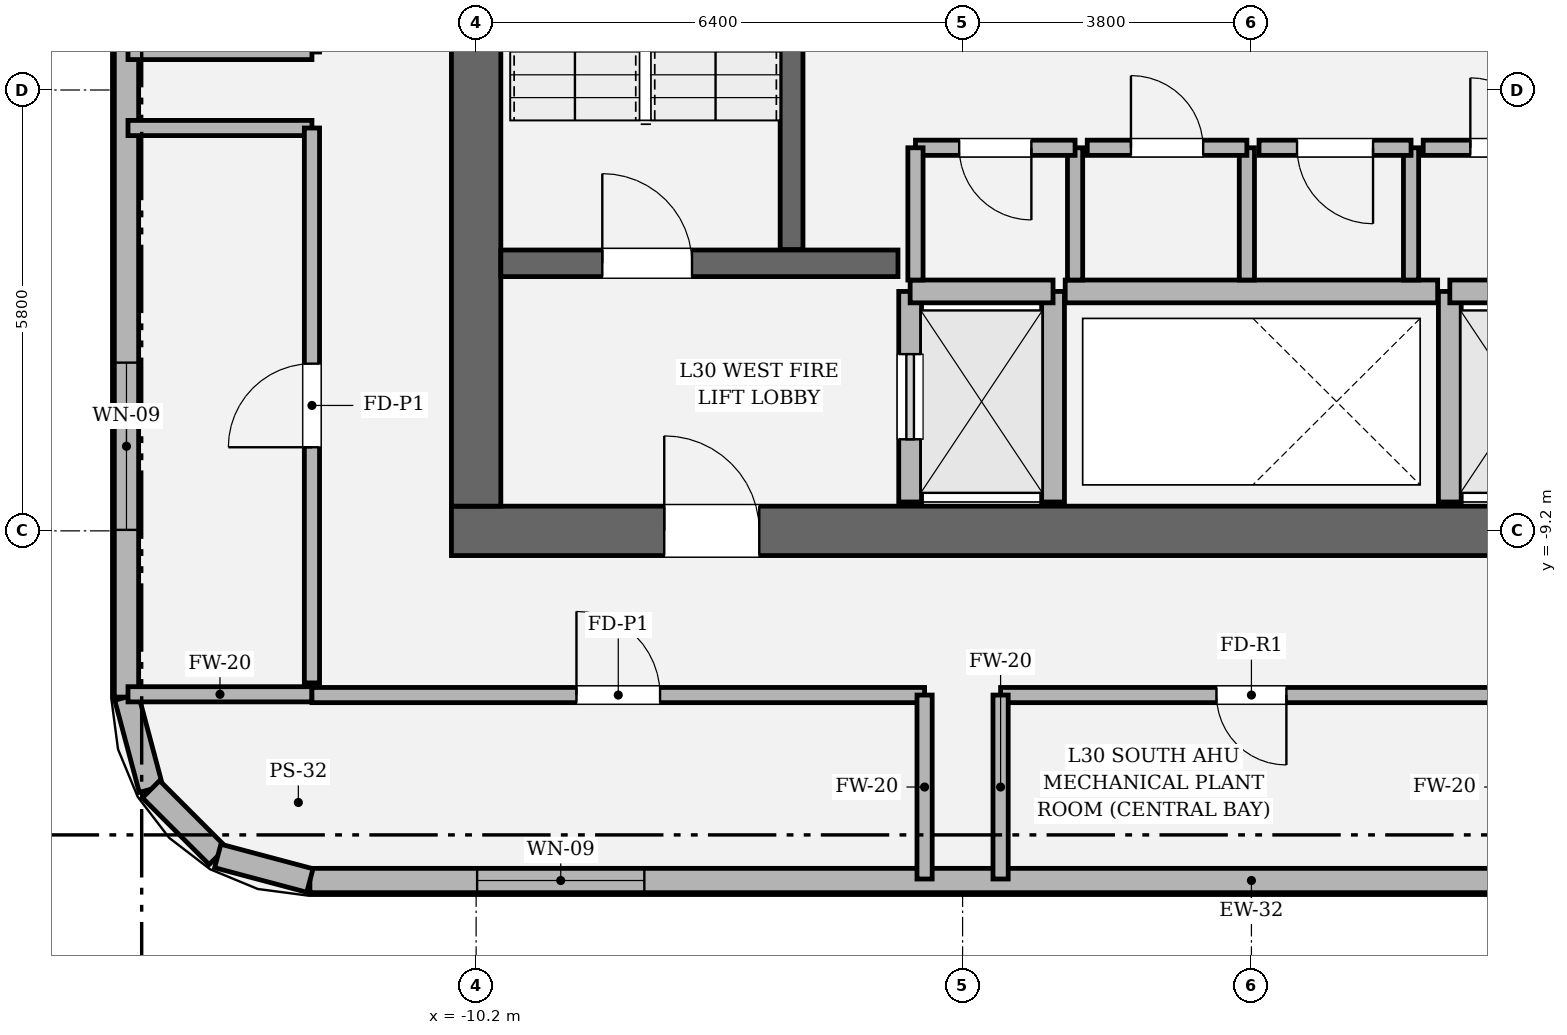
"""IFC4 building model, lengths in metres.
Left out: names, types, materials, properties, quantities, classifications, styles, units other than length and angle.
Written with IfcOpenShell. Run it as: python <this file> out.ifc"""

import sys

from ifc_helpers import new_model, si_unit, direction, frame, frame_2d, origin, place, context, subcontext, project, spatial, rectangle, extrude, element, fill, save


model = new_model("IFC4")
c1 = context("Model", 3, precision=1e-05, world=origin(), true_north=direction((0.0, 1.0)))
c2 = subcontext(c1, "Body", "Model", "MODEL_VIEW")
j1 = project(units=[si_unit("LENGTHUNIT", "METRE"), si_unit("PLANEANGLEUNIT", "RADIAN")], contexts=[c1])
p1 = place(None, origin())
s1 = spatial("IfcSite", under=j1, at=p1, CompositionType="ELEMENT")
p2 = place(p1, origin())
s2 = spatial("IfcBuilding", under=s1, at=p2, CompositionType="ELEMENT")
p3 = place(p2, frame((0.0, 0.0, 130.2)))
s3 = spatial("IfcBuildingStorey", under=s2, at=p3, CompositionType="ELEMENT", Elevation=130.2)
p4 = place(p3, frame((10.525, -9.2, 0.0), z_axis=(0.0, 0.0, 1.0), x_axis=(-1.0, 0.0, 0.0)))
e1 = element("IfcWall", 1, at=p4, inside=s3, PredefinedType="SHEAR", context=c2, shape_type="SweptSolid", body=[
    extrude(rectangle(XDim=21.05, YDim=0.65, at=frame_2d((10.525, 0.0))), origin(), (0.0, 0.0, 1.0), 4.8),
])
p5 = place(p4, frame((2.8, 0.0, 0.0)))
e2 = element("IfcOpeningElement", 2, at=p5, cuts=e1, PredefinedType="OPENING", context=c2, shape_type="SweptSolid", body=[
    extrude(rectangle(XDim=1.25, YDim=2.25, at=frame_2d((0.625, 1.125))), frame((0.0, 0.335, 0.0), z_axis=(0.0, -1.0, 0.0), x_axis=(1.0, 0.0, 0.0)), (0.0, 0.0, 1.0), 0.67),
])
p6 = place(p4, frame((17.0, 0.0, 0.0)))
e3 = element("IfcOpeningElement", 3, at=p6, cuts=e1, PredefinedType="OPENING", context=c2, shape_type="SweptSolid", body=[
    extrude(rectangle(XDim=1.25, YDim=2.25, at=frame_2d((0.625, 1.125))), frame((0.0, 0.335, 0.0), z_axis=(0.0, -1.0, 0.0), x_axis=(1.0, 0.0, 0.0)), (0.0, 0.0, 1.0), 0.67),
])
p7 = place(p3, frame((-10.2, -8.875, 0.0), z_axis=(0.0, 0.0, 1.0), x_axis=(0.0, 1.0, 0.0)))
e4 = element("IfcWall", 4, at=p7, inside=s3, PredefinedType="SHEAR", context=c2, shape_type="SweptSolid", body=[
    extrude(rectangle(XDim=17.75, YDim=0.65, at=frame_2d((8.875, 0.0))), origin(), (0.0, 0.0, 1.0), 4.8),
])
p8 = place(p7, frame((12.665, 0.0, 0.0)))
e5 = element("IfcOpeningElement", 5, at=p8, cuts=e4, PredefinedType="OPENING", context=c2, shape_type="SweptSolid", body=[
    extrude(rectangle(XDim=1.18, YDim=2.2, at=frame_2d((0.59, 1.1))), frame((0.0, 0.335, 0.0), z_axis=(0.0, -1.0, 0.0), x_axis=(1.0, 0.0, 0.0)), (0.0, 0.0, 1.0), 0.67),
])
p9 = place(p3, frame((-6.05, -5.5, 0.0), z_axis=(0.0, 0.0, 1.0), x_axis=(0.0, 1.0, 0.0)))
e6 = element("IfcWall", 6, at=p9, inside=s3, PredefinedType="SOLIDWALL", context=c2, shape_type="SweptSolid", body=[
    extrude(rectangle(XDim=8.95, YDim=0.3, at=frame_2d((4.475, 0.0))), origin(), (0.0, 0.0, 1.0), 4.8),
])
p10 = place(p3, frame((-9.875, -5.68, 0.0), z_axis=(0.0, 0.0, 1.0), x_axis=(1.0, 0.0, 0.0)))
e7 = element("IfcWall", 7, at=p10, inside=s3, PredefinedType="SOLIDWALL", context=c2, shape_type="SweptSolid", body=[
    extrude(rectangle(XDim=5.225, YDim=0.35, at=frame_2d((2.613, 0.0))), origin(), (0.0, 0.0, 1.0), 4.8),
])
p11 = place(p10, frame((1.335, 0.0, 0.0)))
e8 = element("IfcOpeningElement", 8, at=p11, cuts=e7, PredefinedType="OPENING", context=c2, shape_type="SweptSolid", body=[
    extrude(rectangle(XDim=1.18, YDim=2.2, at=frame_2d((0.59, 1.1))), frame((0.0, 0.185, 0.0), z_axis=(0.0, -1.0, 0.0), x_axis=(1.0, 0.0, 0.0)), (0.0, 0.0, 1.0), 0.37),
])
p12 = place(p3, frame((-12.387, -13.8, 0.0), z_axis=(0.0, 0.0, 1.0), x_axis=(1.0, 0.0, 0.0)))
e9 = element("IfcWall", 9, at=p12, inside=s3, PredefinedType="SOLIDWALL", context=c2, shape_type="SweptSolid", body=[
    extrude(rectangle(XDim=24.774, YDim=0.32, at=frame_2d((12.387, 0.0))), origin(), (0.0, 0.0, 1.0), 3.834),
])
p13 = place(p12, frame((2.2, 0.0, 0.9)))
e10 = element("IfcOpeningElement", 10, at=p13, cuts=e9, PredefinedType="OPENING", context=c2, shape_type="SweptSolid", body=[
    extrude(rectangle(XDim=2.2, YDim=1.2, at=frame_2d((1.1, 0.6))), frame((0.0, 0.17, 0.0), z_axis=(0.0, -1.0, 0.0), x_axis=(1.0, 0.0, 0.0)), (0.0, 0.0, 1.0), 0.34),
])
p14 = place(p12, frame((20.374, 0.0, 0.9)))
e11 = element("IfcOpeningElement", 11, at=p14, cuts=e9, PredefinedType="OPENING", context=c2, shape_type="SweptSolid", body=[
    extrude(rectangle(XDim=2.2, YDim=1.2, at=frame_2d((1.1, 0.6))), frame((0.0, 0.17, 0.0), z_axis=(0.0, -1.0, 0.0), x_axis=(1.0, 0.0, 0.0)), (0.0, 0.0, 1.0), 0.34),
])
p15 = place(p3, frame((-14.8, 11.387, 0.0), z_axis=(0.0, 0.0, 1.0), x_axis=(0.0, -1.0, 0.0)))
e12 = element("IfcWall", 12, at=p15, inside=s3, PredefinedType="SOLIDWALL", context=c2, shape_type="SweptSolid", body=[
    extrude(rectangle(XDim=22.774, YDim=0.32, at=frame_2d((11.387, 0.0))), origin(), (0.0, 0.0, 1.0), 3.834),
])
p16 = place(p15, frame((2.2, 0.0, 0.9)))
e13 = element("IfcOpeningElement", 13, at=p16, cuts=e12, PredefinedType="OPENING", context=c2, shape_type="SweptSolid", body=[
    extrude(rectangle(XDim=2.2, YDim=1.2, at=frame_2d((1.1, 0.6))), frame((0.0, 0.17, 0.0), z_axis=(0.0, -1.0, 0.0), x_axis=(1.0, 0.0, 0.0)), (0.0, 0.0, 1.0), 0.34),
])
p17 = place(p15, frame((18.374, 0.0, 0.9)))
e14 = element("IfcOpeningElement", 14, at=p17, cuts=e12, PredefinedType="OPENING", context=c2, shape_type="SweptSolid", body=[
    extrude(rectangle(XDim=2.2, YDim=1.2, at=frame_2d((1.1, 0.6))), frame((0.0, 0.17, 0.0), z_axis=(0.0, -1.0, 0.0), x_axis=(1.0, 0.0, 0.0)), (0.0, 0.0, 1.0), 0.34),
])
p18 = place(p3, frame((-14.8, -11.387, 0.0), z_axis=(0.0, 0.0, 1.0), x_axis=(0.25748094776, -0.966283375382, 0.0)))
e15 = element("IfcWall", 15, at=p18, inside=s3, PredefinedType="SOLIDWALL", context=c2, shape_type="SweptSolid", body=[
    extrude(rectangle(XDim=1.254, YDim=0.32, at=frame_2d((0.627, 0.0))), origin(), (0.0, 0.0, 1.0), 3.984),
])
p19 = place(p3, frame((-14.477, -12.599, 0.0), z_axis=(0.0, 0.0, 1.0), x_axis=(0.707106781187, -0.707106781187, 0.0)))
e16 = element("IfcWall", 16, at=p19, inside=s3, PredefinedType="SOLIDWALL", context=c2, shape_type="SweptSolid", body=[
    extrude(rectangle(XDim=1.242, YDim=0.32, at=frame_2d((0.621, 0.0))), origin(), (0.0, 0.0, 1.0), 3.984),
])
p20 = place(p3, frame((-13.599, -13.477, 0.0), z_axis=(0.0, 0.0, 1.0), x_axis=(0.966283375382, -0.25748094776, 0.0)))
e17 = element("IfcWall", 17, at=p20, inside=s3, PredefinedType="SOLIDWALL", context=c2, shape_type="SweptSolid", body=[
    extrude(rectangle(XDim=1.254, YDim=0.32, at=frame_2d((0.627, 0.0))), origin(), (0.0, 0.0, 1.0), 3.984),
])
p21 = place(p3, frame((-4.49, -8.82, 0.0), z_axis=(0.0, 0.0, 1.0), x_axis=(0.0, 1.0, 0.0)))
e18 = element("IfcWall", 18, at=p21, inside=s3, PredefinedType="SOLIDWALL", context=c2, shape_type="SweptSolid", body=[
    extrude(rectangle(XDim=2.77, YDim=0.3, at=frame_2d((1.385, 0.0))), origin(), (0.0, 0.0, 1.0), 4.54),
])
p22 = place(p21, frame((0.825, 0.0, 0.0)))
e19 = element("IfcOpeningElement", 19, at=p22, cuts=e18, PredefinedType="OPENING", context=c2, shape_type="SweptSolid", body=[
    extrude(rectangle(XDim=1.12, YDim=2.25, at=frame_2d((0.56, 1.125))), frame((0.0, 0.16, 0.0), z_axis=(0.0, -1.0, 0.0), x_axis=(1.0, 0.0, 0.0)), (0.0, 0.0, 1.0), 0.32),
])
p23 = place(p3, frame((-2.61, -8.82, 0.0), z_axis=(0.0, 0.0, 1.0), x_axis=(0.0, 1.0, 0.0)))
e20 = element("IfcWall", 20, at=p23, inside=s3, PredefinedType="SOLIDWALL", context=c2, shape_type="SweptSolid", body=[
    extrude(rectangle(XDim=2.77, YDim=0.3, at=frame_2d((1.385, 0.0))), origin(), (0.0, 0.0, 1.0), 4.54),
])
p24 = place(p3, frame((-4.49, -6.05, 0.0), z_axis=(0.0, 0.0, 1.0), x_axis=(1.0, 0.0, 0.0)))
e21 = element("IfcWall", 21, at=p24, inside=s3, PredefinedType="SOLIDWALL", context=c2, shape_type="SweptSolid", body=[
    extrude(rectangle(XDim=1.88, YDim=0.3, at=frame_2d((0.94, 0.0))), origin(), (0.0, 0.0, 1.0), 4.54),
])
p25 = place(p3, frame((2.61, -8.82, 0.0), z_axis=(0.0, 0.0, 1.0), x_axis=(0.0, 1.0, 0.0)))
e22 = element("IfcWall", 22, at=p25, inside=s3, PredefinedType="SOLIDWALL", context=c2, shape_type="SweptSolid", body=[
    extrude(rectangle(XDim=2.77, YDim=0.3, at=frame_2d((1.385, 0.0))), origin(), (0.0, 0.0, 1.0), 4.54),
])
p26 = place(p3, frame((2.61, -6.05, 0.0), z_axis=(0.0, 0.0, 1.0), x_axis=(1.0, 0.0, 0.0)))
e23 = element("IfcWall", 23, at=p26, inside=s3, PredefinedType="SOLIDWALL", context=c2, shape_type="SweptSolid", body=[
    extrude(rectangle(XDim=1.88, YDim=0.3, at=frame_2d((0.94, 0.0))), origin(), (0.0, 0.0, 1.0), 4.54),
])
p27 = place(p3, frame((-2.45, -6.05, 0.0), z_axis=(0.0, 0.0, 1.0), x_axis=(1.0, 0.0, 0.0)))
e24 = element("IfcWall", 24, at=p27, inside=s3, PredefinedType="SOLIDWALL", context=c2, shape_type="SweptSolid", body=[
    extrude(rectangle(XDim=4.9, YDim=0.3, at=frame_2d((2.45, 0.0))), origin(), (0.0, 0.0, 1.0), 4.54),
])
p28 = place(p3, frame((-2.32, -5.9, 0.0), z_axis=(0.0, 0.0, 1.0), x_axis=(0.0, 1.0, 0.0)))
e25 = element("IfcWall", 25, at=p28, inside=s3, PredefinedType="SOLIDWALL", context=c2, shape_type="SweptSolid", body=[
    extrude(rectangle(XDim=1.74, YDim=0.2, at=frame_2d((0.87, 0.0))), origin(), (0.0, 0.0, 1.0), 4.54),
])
p29 = place(p3, frame((-2.32, -4.16, 0.0), z_axis=(0.0, 0.0, 1.0), x_axis=(-1.0, 0.0, 0.0)))
e26 = element("IfcWall", 26, at=p29, inside=s3, PredefinedType="SOLIDWALL", context=c2, shape_type="SweptSolid", body=[
    extrude(rectangle(XDim=2.1, YDim=0.2, at=frame_2d((1.05, 0.0))), origin(), (0.0, 0.0, 1.0), 4.54),
])
p30 = place(p29, frame((0.575, 0.0, 0.0)))
e27 = element("IfcOpeningElement", 27, at=p30, cuts=e26, PredefinedType="OPENING", context=c2, shape_type="SweptSolid", body=[
    extrude(rectangle(XDim=0.95, YDim=2.15, at=frame_2d((0.475, 1.075))), frame((0.0, 0.11, 0.0), z_axis=(0.0, -1.0, 0.0), x_axis=(1.0, 0.0, 0.0)), (0.0, 0.0, 1.0), 0.22),
])
for number, where, z_axis, x_axis in (
    (28, (-4.42, -4.16, 0.0), (0.0, 0.0, 1.0), (0.0, -1.0, 0.0)),
    (29, (-0.06, -5.9, 0.0), (0.0, 0.0, 1.0), (0.0, 1.0, 0.0)),
):
    element("IfcWall", number, at=place(p3, frame(where, z_axis=z_axis, x_axis=x_axis)), inside=s3, PredefinedType="SOLIDWALL", context=c2, shape_type="SweptSolid", body=[
        extrude(rectangle(XDim=1.74, YDim=0.2, at=frame_2d((0.87, 0.0))), origin(), (0.0, 0.0, 1.0), 4.54),
    ])
p31 = place(p3, frame((-0.06, -4.16, 0.0), z_axis=(0.0, 0.0, 1.0), x_axis=(-1.0, 0.0, 0.0)))
e30 = element("IfcWall", 30, at=p31, inside=s3, PredefinedType="SOLIDWALL", context=c2, shape_type="SweptSolid", body=[
    extrude(rectangle(XDim=2.1, YDim=0.2, at=frame_2d((1.05, 0.0))), origin(), (0.0, 0.0, 1.0), 4.54),
])
p32 = place(p31, frame((0.575, 0.0, 0.0)))
e31 = element("IfcOpeningElement", 31, at=p32, cuts=e30, PredefinedType="OPENING", context=c2, shape_type="SweptSolid", body=[
    extrude(rectangle(XDim=0.95, YDim=2.15, at=frame_2d((0.475, 1.075))), frame((0.0, 0.11, 0.0), z_axis=(0.0, -1.0, 0.0), x_axis=(1.0, 0.0, 0.0)), (0.0, 0.0, 1.0), 0.22),
])
p33 = place(p3, frame((2.1, -5.9, 0.0), z_axis=(0.0, 0.0, 1.0), x_axis=(0.0, 1.0, 0.0)))
e32 = element("IfcWall", 32, at=p33, inside=s3, PredefinedType="SOLIDWALL", context=c2, shape_type="SweptSolid", body=[
    extrude(rectangle(XDim=1.74, YDim=0.2, at=frame_2d((0.87, 0.0))), origin(), (0.0, 0.0, 1.0), 4.54),
])
p34 = place(p3, frame((2.1, -4.16, 0.0), z_axis=(0.0, 0.0, 1.0), x_axis=(-1.0, 0.0, 0.0)))
e33 = element("IfcWall", 33, at=p34, inside=s3, PredefinedType="SOLIDWALL", context=c2, shape_type="SweptSolid", body=[
    extrude(rectangle(XDim=2.0, YDim=0.2, at=frame_2d((1.0, 0.0))), origin(), (0.0, 0.0, 1.0), 4.54),
])
p35 = place(p34, frame((0.5, 0.0, 0.0)))
e34 = element("IfcOpeningElement", 34, at=p35, cuts=e33, PredefinedType="OPENING", context=c2, shape_type="SweptSolid", body=[
    extrude(rectangle(XDim=1.0, YDim=2.15, at=frame_2d((0.5, 1.075))), frame((0.0, 0.11, 0.0), z_axis=(0.0, -1.0, 0.0), x_axis=(1.0, 0.0, 0.0)), (0.0, 0.0, 1.0), 0.22),
])
p36 = place(p3, frame((4.42, -4.16, 0.0), z_axis=(0.0, 0.0, 1.0), x_axis=(-1.0, 0.0, 0.0)))
e35 = element("IfcWall", 35, at=p36, inside=s3, PredefinedType="SOLIDWALL", context=c2, shape_type="SweptSolid", body=[
    extrude(rectangle(XDim=2.16, YDim=0.2, at=frame_2d((1.08, 0.0))), origin(), (0.0, 0.0, 1.0), 4.54),
])
p37 = place(p36, frame((0.62, 0.0, 0.0)))
e36 = element("IfcOpeningElement", 36, at=p37, cuts=e35, PredefinedType="OPENING", context=c2, shape_type="SweptSolid", body=[
    extrude(rectangle(XDim=0.92, YDim=2.1, at=frame_2d((0.46, 1.05))), frame((0.0, 0.11, 0.0), z_axis=(0.0, -1.0, 0.0), x_axis=(1.0, 0.0, 0.0)), (0.0, 0.0, 1.0), 0.22),
])
p38 = place(p3, frame((-14.78, -11.35, 0.0), z_axis=(0.0, 0.0, 1.0), x_axis=(1.0, 0.0, 0.0)))
e37 = element("IfcWall", 37, at=p38, inside=s3, PredefinedType="SOLIDWALL", context=c2, shape_type="SweptSolid", body=[
    extrude(rectangle(XDim=2.42, YDim=0.2, at=frame_2d((1.21, 0.0))), origin(), (0.0, 0.0, 1.0), 3.984),
])
p39 = place(p3, frame((-12.36, -11.36, 0.0), z_axis=(0.0, 0.0, 1.0), x_axis=(1.0, 0.0, 0.0)))
e38 = element("IfcWall", 38, at=p39, inside=s3, PredefinedType="SOLIDWALL", context=c2, shape_type="SweptSolid", body=[
    extrude(rectangle(XDim=8.06, YDim=0.2, at=frame_2d((4.03, 0.0))), origin(), (0.0, 0.0, 1.0), 4.54),
])
p40 = place(p39, frame((3.48, 0.0, 0.0)))
e39 = element("IfcOpeningElement", 39, at=p40, cuts=e38, PredefinedType="OPENING", context=c2, shape_type="SweptSolid", body=[
    extrude(rectangle(XDim=1.1, YDim=2.2, at=frame_2d((0.55, 1.1))), frame((0.0, 0.11, 0.0), z_axis=(0.0, -1.0, 0.0), x_axis=(1.0, 0.0, 0.0)), (0.0, 0.0, 1.0), 0.22),
])
p41 = place(p3, frame((-4.3, -11.36, 0.0), z_axis=(0.0, 0.0, 1.0), x_axis=(0.0, -1.0, 0.0)))
e40 = element("IfcWall", 40, at=p41, inside=s3, PredefinedType="SOLIDWALL", context=c2, shape_type="SweptSolid", body=[
    extrude(rectangle(XDim=2.42, YDim=0.2, at=frame_2d((1.21, 0.0))), origin(), (0.0, 0.0, 1.0), 3.984),
])
p42 = place(p3, frame((-3.3, -11.36, 0.0), z_axis=(0.0, 0.0, 1.0), x_axis=(1.0, 0.0, 0.0)))
e41 = element("IfcWall", 41, at=p42, inside=s3, PredefinedType="SOLIDWALL", context=c2, shape_type="SweptSolid", body=[
    extrude(rectangle(XDim=6.6, YDim=0.2, at=frame_2d((3.3, 0.0))), origin(), (0.0, 0.0, 1.0), 4.54),
])
p43 = place(p42, frame((2.84, 0.0, 0.0)))
e42 = element("IfcOpeningElement", 42, at=p43, cuts=e41, PredefinedType="OPENING", context=c2, shape_type="SweptSolid", body=[
    extrude(rectangle(XDim=0.92, YDim=2.1, at=frame_2d((0.46, 1.05))), frame((0.0, 0.11, 0.0), z_axis=(0.0, -1.0, 0.0), x_axis=(1.0, 0.0, 0.0)), (0.0, 0.0, 1.0), 0.22),
])
for number, where, z_axis, x_axis in (
    (43, (-3.3, -13.78, 0.0), (0.0, 0.0, 1.0), (0.0, 1.0, 0.0)),
    (44, (-14.78, -3.9, 0.0), (0.0, 0.0, 1.0), (1.0, 0.0, 0.0)),
):
    element("IfcWall", number, at=place(p3, frame(where, z_axis=z_axis, x_axis=x_axis)), inside=s3, PredefinedType="SOLIDWALL", context=c2, shape_type="SweptSolid", body=[
        extrude(rectangle(XDim=2.42, YDim=0.2, at=frame_2d((1.21, 0.0))), origin(), (0.0, 0.0, 1.0), 3.984),
    ])
p44 = place(p3, frame((-12.36, -3.9, 0.0), z_axis=(0.0, 0.0, 1.0), x_axis=(0.0, -1.0, 0.0)))
e45 = element("IfcWall", 45, at=p44, inside=s3, PredefinedType="SOLIDWALL", context=c2, shape_type="SweptSolid", body=[
    extrude(rectangle(XDim=7.3, YDim=0.2, at=frame_2d((3.65, 0.0))), origin(), (0.0, 0.0, 1.0), 4.54),
])
p45 = place(p44, frame((3.1, 0.0, 0.0)))
e46 = element("IfcOpeningElement", 46, at=p45, cuts=e45, PredefinedType="OPENING", context=c2, shape_type="SweptSolid", body=[
    extrude(rectangle(XDim=1.1, YDim=2.2, at=frame_2d((0.55, 1.1))), frame((0.0, 0.11, 0.0), z_axis=(0.0, -1.0, 0.0), x_axis=(1.0, 0.0, 0.0)), (0.0, 0.0, 1.0), 0.22),
])
p46 = place(p3, frame((-12.36, -2.9, 0.0), z_axis=(0.0, 0.0, 1.0), x_axis=(-1.0, 0.0, 0.0)))
e47 = element("IfcWall", 47, at=p46, inside=s3, PredefinedType="SOLIDWALL", context=c2, shape_type="SweptSolid", body=[
    extrude(rectangle(XDim=2.42, YDim=0.2, at=frame_2d((1.21, 0.0))), origin(), (0.0, 0.0, 1.0), 3.984),
])
p47 = place(p13, origin())
e48 = element("IfcWindow", 48, at=p47, inside=s3, PartitioningType="SINGLE_PANEL", PredefinedType="WINDOW", context=c2, shape_type="SweptSolid", body=[
    extrude(rectangle(XDim=2.2, YDim=1.2, at=frame_2d((1.1, 0.6))), frame((0.0, 0.03, 0.0), z_axis=(0.0, -1.0, 0.0), x_axis=(1.0, 0.0, 0.0)), (0.0, 0.0, 1.0), 0.06),
])
fill(e10, e48)
p48 = place(p17, origin())
e49 = element("IfcWindow", 49, at=p48, inside=s3, PartitioningType="SINGLE_PANEL", PredefinedType="WINDOW", context=c2, shape_type="SweptSolid", body=[
    extrude(rectangle(XDim=2.2, YDim=1.2, at=frame_2d((1.1, 0.6))), frame((0.0, 0.03, 0.0), z_axis=(0.0, -1.0, 0.0), x_axis=(1.0, 0.0, 0.0)), (0.0, 0.0, 1.0), 0.06),
])
fill(e14, e49)
p49 = place(p11, origin())
e50 = element("IfcDoor", 50, at=p49, inside=s3, OperationType="SINGLE_SWING_LEFT", PredefinedType="DOOR", context=c2, shape_type="SweptSolid", body=[
    extrude(rectangle(XDim=1.18, YDim=2.2, at=frame_2d((0.59, 1.1))), frame((0.0, 0.025, 0.0), z_axis=(0.0, -1.0, 0.0), x_axis=(1.0, 0.0, 0.0)), (0.0, 0.0, 1.0), 0.05),
])
fill(e8, e50)
p50 = place(p6, origin())
e51 = element("IfcDoor", 51, at=p50, inside=s3, OperationType="SINGLE_SWING_RIGHT", PredefinedType="DOOR", context=c2, shape_type="SweptSolid", body=[
    extrude(rectangle(XDim=1.25, YDim=2.25, at=frame_2d((0.625, 1.125))), frame((0.0, 0.025, 0.0), z_axis=(0.0, -1.0, 0.0), x_axis=(1.0, 0.0, 0.0)), (0.0, 0.0, 1.0), 0.05),
])
fill(e3, e51)
p51 = place(p22, origin())
e52 = element("IfcDoor", 52, at=p51, inside=s3, OperationType="SLIDING_TO_LEFT", PredefinedType="DOOR", context=c2, shape_type="SweptSolid", body=[
    extrude(rectangle(XDim=1.12, YDim=2.25, at=frame_2d((0.56, 1.125))), frame((0.0, 0.025, 0.0), z_axis=(0.0, -1.0, 0.0), x_axis=(1.0, 0.0, 0.0)), (0.0, 0.0, 1.0), 0.05),
])
fill(e19, e52)
p52 = place(p30, origin())
e53 = element("IfcDoor", 53, at=p52, inside=s3, OperationType="SINGLE_SWING_LEFT", PredefinedType="DOOR", context=c2, shape_type="SweptSolid", body=[
    extrude(rectangle(XDim=0.95, YDim=2.15, at=frame_2d((0.475, 1.075))), frame((0.0, 0.025, 0.0), z_axis=(0.0, -1.0, 0.0), x_axis=(1.0, 0.0, 0.0)), (0.0, 0.0, 1.0), 0.05),
])
fill(e27, e53)
p53 = place(p32, origin())
e54 = element("IfcDoor", 54, at=p53, inside=s3, OperationType="SINGLE_SWING_RIGHT", PredefinedType="DOOR", context=c2, shape_type="SweptSolid", body=[
    extrude(rectangle(XDim=0.95, YDim=2.15, at=frame_2d((0.475, 1.075))), frame((0.0, 0.025, 0.0), z_axis=(0.0, -1.0, 0.0), x_axis=(1.0, 0.0, 0.0)), (0.0, 0.0, 1.0), 0.05),
])
fill(e31, e54)
p54 = place(p35, origin())
e55 = element("IfcDoor", 55, at=p54, inside=s3, OperationType="SINGLE_SWING_LEFT", PredefinedType="DOOR", context=c2, shape_type="SweptSolid", body=[
    extrude(rectangle(XDim=1.0, YDim=2.15, at=frame_2d((0.5, 1.075))), frame((0.0, 0.025, 0.0), z_axis=(0.0, -1.0, 0.0), x_axis=(1.0, 0.0, 0.0)), (0.0, 0.0, 1.0), 0.05),
])
fill(e34, e55)
p55 = place(p37, origin())
e56 = element("IfcDoor", 56, at=p55, inside=s3, OperationType="SINGLE_SWING_RIGHT", PredefinedType="DOOR", context=c2, shape_type="SweptSolid", body=[
    extrude(rectangle(XDim=0.92, YDim=2.1, at=frame_2d((0.46, 1.05))), frame((0.0, 0.025, 0.0), z_axis=(0.0, -1.0, 0.0), x_axis=(1.0, 0.0, 0.0)), (0.0, 0.0, 1.0), 0.05),
])
fill(e36, e56)
p56 = place(p40, origin())
e57 = element("IfcDoor", 57, at=p56, inside=s3, OperationType="SINGLE_SWING_LEFT", PredefinedType="DOOR", context=c2, shape_type="SweptSolid", body=[
    extrude(rectangle(XDim=1.1, YDim=2.2, at=frame_2d((0.55, 1.1))), frame((0.0, 0.025, 0.0), z_axis=(0.0, -1.0, 0.0), x_axis=(1.0, 0.0, 0.0)), (0.0, 0.0, 1.0), 0.05),
])
fill(e39, e57)
p57 = place(p43, origin())
e58 = element("IfcDoor", 58, at=p57, inside=s3, OperationType="SINGLE_SWING_RIGHT", PredefinedType="DOOR", context=c2, shape_type="SweptSolid", body=[
    extrude(rectangle(XDim=0.92, YDim=2.1, at=frame_2d((0.46, 1.05))), frame((0.0, 0.025, 0.0), z_axis=(0.0, -1.0, 0.0), x_axis=(1.0, 0.0, 0.0)), (0.0, 0.0, 1.0), 0.05),
])
fill(e42, e58)
p58 = place(p45, origin())
e59 = element("IfcDoor", 59, at=p58, inside=s3, OperationType="SINGLE_SWING_RIGHT", PredefinedType="DOOR", context=c2, shape_type="SweptSolid", body=[
    extrude(rectangle(XDim=1.1, YDim=2.2, at=frame_2d((0.55, 1.1))), frame((0.0, 0.025, 0.0), z_axis=(0.0, -1.0, 0.0), x_axis=(1.0, 0.0, 0.0)), (0.0, 0.0, 1.0), 0.05),
])
fill(e46, e59)
save(model, sys.argv[1])
